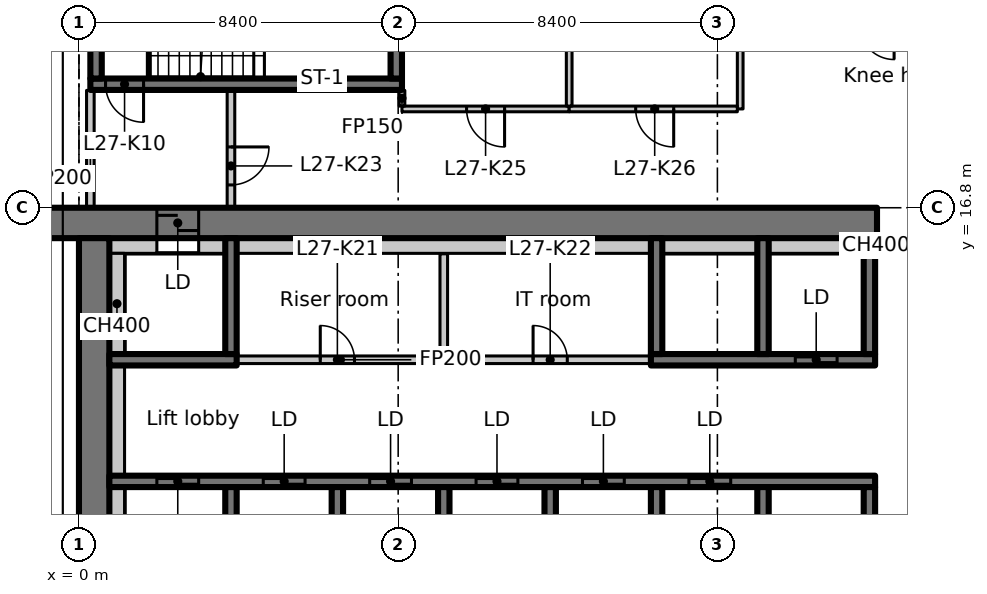
"""IFC4 building model, lengths in metres.
Left out: names, types, materials, properties, quantities, classifications, styles, units other than length and angle.
Written with IfcOpenShell. Run it as: python <this file> out.ifc"""

import sys

from ifc_helpers import new_model, si_unit, direction, frame, frame_2d, origin, place, context, subcontext, project, spatial, rectangle, extrude, element, fill, save


model = new_model("IFC4")
c1 = context("Model", 3, precision=1e-05, world=origin(), true_north=direction((0.0, 1.0)))
c2 = subcontext(c1, "Body", "Model", "MODEL_VIEW")
j1 = project(units=[si_unit("LENGTHUNIT", "METRE"), si_unit("PLANEANGLEUNIT", "RADIAN")], contexts=[c1])
p1 = place(None, origin())
s1 = spatial("IfcSite", under=j1, at=p1, CompositionType="ELEMENT")
p2 = place(p1, origin())
s2 = spatial("IfcBuilding", under=s1, at=p2, CompositionType="ELEMENT")
p3 = place(p2, frame((0.0, 0.0, 113.3)))
s3 = spatial("IfcBuildingStorey", under=s2, at=p3, CompositionType="ELEMENT", Elevation=113.3)
p4 = place(p3, frame((-1.1, 16.4, 0.0), z_axis=(0.0, 0.0, 1.0), x_axis=(1.0, 0.0, 0.0)))
e1 = element("IfcWall", 1, at=p4, inside=s3, PredefinedType="SHEAR", context=c2, shape_type="SweptSolid", body=[
    extrude(rectangle(XDim=22.1, YDim=0.8, at=frame_2d((11.05, 0.0))), origin(), (0.0, 0.0, 1.0), 3.35),
])
p5 = place(p4, frame((3.15, 0.0, 0.0)))
e2 = element("IfcOpeningElement", 2, at=p5, cuts=e1, PredefinedType="OPENING", context=c2, shape_type="SweptSolid", body=[
    extrude(rectangle(XDim=1.1, YDim=2.3, at=frame_2d((0.55, 1.15))), frame((0.0, 0.41, 0.0), z_axis=(0.0, -1.0, 0.0), x_axis=(1.0, 0.0, 0.0)), (0.0, 0.0, 1.0), 0.82),
])
p6 = place(p3, frame((0.4, 7.136, 0.0), z_axis=(0.0, 0.0, 1.0), x_axis=(0.0, 1.0, 0.0)))
e3 = element("IfcWall", 3, at=p6, inside=s3, PredefinedType="SHEAR", context=c2, shape_type="SweptSolid", body=[
    extrude(rectangle(XDim=8.864, YDim=0.8, at=frame_2d((4.432, 0.0))), origin(), (0.0, 0.0, 1.0), 3.35),
])
p7 = place(p3, frame((0.8, 15.8, 0.0), z_axis=(0.0, 0.0, 1.0), x_axis=(1.0, 0.0, 0.0)))
e4 = element("IfcWall", 4, at=p7, inside=s3, PredefinedType="PARTITIONING", context=c2, shape_type="SweptSolid", body=[
    extrude(rectangle(XDim=1.25, YDim=0.4, at=frame_2d((0.625, 0.0))), origin(), (0.0, 0.0, 1.0), 3.35),
])
p8 = place(p3, frame((0.8, 9.6, 0.0), z_axis=(0.0, 0.0, 1.0), x_axis=(1.0, 0.0, 0.0)))
e5 = element("IfcWall", 5, at=p8, inside=s3, PredefinedType="SHEAR", context=c2, shape_type="SweptSolid", body=[
    extrude(rectangle(XDim=20.15, YDim=0.3, at=frame_2d((10.075, 0.0))), origin(), (0.0, 0.0, 1.0), 3.35),
])
p9 = place(p8, frame((1.25, 0.0, 0.0)))
e6 = element("IfcOpeningElement", 6, at=p9, cuts=e5, PredefinedType="OPENING", context=c2, shape_type="SweptSolid", body=[
    extrude(rectangle(XDim=1.1, YDim=2.3, at=frame_2d((0.55, 1.15))), frame((0.0, 0.16, 0.0), z_axis=(0.0, -1.0, 0.0), x_axis=(1.0, 0.0, 0.0)), (0.0, 0.0, 1.0), 0.32),
])
p10 = place(p8, frame((4.05, 0.0, 0.0)))
e7 = element("IfcOpeningElement", 7, at=p10, cuts=e5, PredefinedType="OPENING", context=c2, shape_type="SweptSolid", body=[
    extrude(rectangle(XDim=1.1, YDim=2.3, at=frame_2d((0.55, 1.15))), frame((0.0, 0.16, 0.0), z_axis=(0.0, -1.0, 0.0), x_axis=(1.0, 0.0, 0.0)), (0.0, 0.0, 1.0), 0.32),
])
p11 = place(p8, frame((6.85, 0.0, 0.0)))
e8 = element("IfcOpeningElement", 8, at=p11, cuts=e5, PredefinedType="OPENING", context=c2, shape_type="SweptSolid", body=[
    extrude(rectangle(XDim=1.1, YDim=2.3, at=frame_2d((0.55, 1.15))), frame((0.0, 0.16, 0.0), z_axis=(0.0, -1.0, 0.0), x_axis=(1.0, 0.0, 0.0)), (0.0, 0.0, 1.0), 0.32),
])
p12 = place(p8, frame((9.65, 0.0, 0.0)))
e9 = element("IfcOpeningElement", 9, at=p12, cuts=e5, PredefinedType="OPENING", context=c2, shape_type="SweptSolid", body=[
    extrude(rectangle(XDim=1.1, YDim=2.3, at=frame_2d((0.55, 1.15))), frame((0.0, 0.16, 0.0), z_axis=(0.0, -1.0, 0.0), x_axis=(1.0, 0.0, 0.0)), (0.0, 0.0, 1.0), 0.32),
])
p13 = place(p8, frame((12.45, 0.0, 0.0)))
e10 = element("IfcOpeningElement", 10, at=p13, cuts=e5, PredefinedType="OPENING", context=c2, shape_type="SweptSolid", body=[
    extrude(rectangle(XDim=1.1, YDim=2.3, at=frame_2d((0.55, 1.15))), frame((0.0, 0.16, 0.0), z_axis=(0.0, -1.0, 0.0), x_axis=(1.0, 0.0, 0.0)), (0.0, 0.0, 1.0), 0.32),
])
p14 = place(p8, frame((15.25, 0.0, 0.0)))
e11 = element("IfcOpeningElement", 11, at=p14, cuts=e5, PredefinedType="OPENING", context=c2, shape_type="SweptSolid", body=[
    extrude(rectangle(XDim=1.1, YDim=2.3, at=frame_2d((0.55, 1.15))), frame((0.0, 0.16, 0.0), z_axis=(0.0, -1.0, 0.0), x_axis=(1.0, 0.0, 0.0)), (0.0, 0.0, 1.0), 0.32),
])
for number, where, z_axis, x_axis in (
    (12, (4.0, 7.15, 0.0), (0.0, 0.0, 1.0), (0.0, 1.0, 0.0)),
    (13, (6.8, 7.15, 0.0), (0.0, 0.0, 1.0), (0.0, 1.0, 0.0)),
    (14, (9.6, 7.15, 0.0), (0.0, 0.0, 1.0), (0.0, 1.0, 0.0)),
    (15, (12.4, 7.15, 0.0), (0.0, 0.0, 1.0), (0.0, 1.0, 0.0)),
    (16, (15.2, 7.15, 0.0), (0.0, 0.0, 1.0), (0.0, 1.0, 0.0)),
    (17, (18.0, 7.15, 0.0), (0.0, 0.0, 1.0), (0.0, 1.0, 0.0)),
    (18, (20.8, 7.15, 0.0), (0.0, 0.0, 1.0), (0.0, 1.0, 0.0)),
):
    element("IfcWall", number, at=place(p3, frame(where, z_axis=z_axis, x_axis=x_axis)), inside=s3, PredefinedType="SHEAR", context=c2, shape_type="SweptSolid", body=[
        extrude(rectangle(XDim=2.3, YDim=0.3, at=frame_2d((1.15, 0.0))), origin(), (0.0, 0.0, 1.0), 3.35),
    ])
p15 = place(p3, frame((0.8, 12.8, 0.0), z_axis=(0.0, 0.0, 1.0), x_axis=(1.0, 0.0, 0.0)))
e19 = element("IfcWall", 19, at=p15, inside=s3, PredefinedType="SHEAR", context=c2, shape_type="SweptSolid", body=[
    extrude(rectangle(XDim=3.35, YDim=0.3, at=frame_2d((1.675, 0.0))), origin(), (0.0, 0.0, 1.0), 3.35),
])
p16 = place(p3, frame((4.0, 12.95, 0.0), z_axis=(0.0, 0.0, 1.0), x_axis=(0.0, 1.0, 0.0)))
e20 = element("IfcWall", 20, at=p16, inside=s3, PredefinedType="SHEAR", context=c2, shape_type="SweptSolid", body=[
    extrude(rectangle(XDim=3.05, YDim=0.3, at=frame_2d((1.525, 0.0))), origin(), (0.0, 0.0, 1.0), 3.35),
])
p17 = place(p3, frame((15.05, 12.8, 0.0), z_axis=(0.0, 0.0, 1.0), x_axis=(1.0, 0.0, 0.0)))
e21 = element("IfcWall", 21, at=p17, inside=s3, PredefinedType="SHEAR", context=c2, shape_type="SweptSolid", body=[
    extrude(rectangle(XDim=5.9, YDim=0.3, at=frame_2d((2.95, 0.0))), origin(), (0.0, 0.0, 1.0), 3.35),
])
p18 = place(p17, frame((3.8, 0.0, 0.0)))
e22 = element("IfcOpeningElement", 22, at=p18, cuts=e21, PredefinedType="OPENING", context=c2, shape_type="SweptSolid", body=[
    extrude(rectangle(XDim=1.1, YDim=2.3, at=frame_2d((0.55, 1.15))), frame((0.0, 0.16, 0.0), z_axis=(0.0, -1.0, 0.0), x_axis=(1.0, 0.0, 0.0)), (0.0, 0.0, 1.0), 0.32),
])
for number, where, z_axis, x_axis in (
    (23, (15.2, 12.95, 0.0), (0.0, 0.0, 1.0), (0.0, 1.0, 0.0)),
    (24, (18.0, 12.95, 0.0), (0.0, 0.0, 1.0), (0.0, 1.0, 0.0)),
    (25, (20.8, 12.95, 0.0), (0.0, 0.0, 1.0), (0.0, 1.0, 0.0)),
):
    element("IfcWall", number, at=place(p3, frame(where, z_axis=z_axis, x_axis=x_axis)), inside=s3, PredefinedType="SHEAR", context=c2, shape_type="SweptSolid", body=[
        extrude(rectangle(XDim=3.05, YDim=0.3, at=frame_2d((1.525, 0.0))), origin(), (0.0, 0.0, 1.0), 3.35),
    ])
p19 = place(p3, frame((8.5, 20.05, 0.0), z_axis=(0.0, 0.0, 1.0), x_axis=(-1.0, 0.0, 0.0)))
e26 = element("IfcWall", 26, at=p19, inside=s3, PredefinedType="SHEAR", context=c2, shape_type="SweptSolid", body=[
    extrude(rectangle(XDim=8.2, YDim=0.3, at=frame_2d((4.1, 0.0))), origin(), (0.0, 0.0, 1.0), 3.35),
])
p20 = place(p19, frame((6.8, 0.0, 0.0)))
e27 = element("IfcOpeningElement", 27, at=p20, cuts=e26, PredefinedType="OPENING", context=c2, shape_type="SweptSolid", body=[
    extrude(rectangle(XDim=1.0, YDim=2.1, at=frame_2d((0.5, 1.05))), frame((0.0, 0.16, 0.0), z_axis=(0.0, -1.0, 0.0), x_axis=(1.0, 0.0, 0.0)), (0.0, 0.0, 1.0), 0.32),
])
for number, where, z_axis, x_axis in (
    (28, (0.45, 20.2, 0.0), (0.0, 0.0, 1.0), (0.0, 1.0, 0.0)),
    (29, (8.35, 20.2, 0.0), (0.0, 0.0, 1.0), (0.0, 1.0, 0.0)),
):
    element("IfcWall", number, at=place(p3, frame(where, z_axis=z_axis, x_axis=x_axis)), inside=s3, PredefinedType="SHEAR", context=c2, shape_type="SweptSolid", body=[
        extrude(rectangle(XDim=2.55, YDim=0.3, at=frame_2d((1.275, 0.0))), origin(), (0.0, 0.0, 1.0), 3.35),
    ])
p21 = place(p3, frame((0.3, 16.812, 0.0), z_axis=(0.0, 0.0, 1.0), x_axis=(0.0, 1.0, 0.0)))
e30 = element("IfcWall", 30, at=p21, inside=s3, PredefinedType="PARTITIONING", context=c2, shape_type="SweptSolid", body=[
    extrude(rectangle(XDim=3.076, YDim=0.2, at=frame_2d((1.538, 0.0))), origin(), (0.0, 0.0, 1.0), 2.98),
])
p22 = place(p3, frame((4.0, 19.888, 0.0), z_axis=(0.0, 0.0, 1.0), x_axis=(0.0, -1.0, 0.0)))
e31 = element("IfcWall", 31, at=p22, inside=s3, PredefinedType="PARTITIONING", context=c2, shape_type="SweptSolid", body=[
    extrude(rectangle(XDim=3.076, YDim=0.2, at=frame_2d((1.538, 0.0))), origin(), (0.0, 0.0, 1.0), 3.35),
])
p23 = place(p22, frame((1.488, 0.0, 0.0)))
e32 = element("IfcOpeningElement", 32, at=p23, cuts=e31, PredefinedType="OPENING", context=c2, shape_type="SweptSolid", body=[
    extrude(rectangle(XDim=1.0, YDim=2.1, at=frame_2d((0.5, 1.05))), frame((0.0, 0.11, 0.0), z_axis=(0.0, -1.0, 0.0), x_axis=(1.0, 0.0, 0.0)), (0.0, 0.0, 1.0), 0.22),
])
p24 = place(p3, frame((4.162, 12.8, 0.0), z_axis=(0.0, 0.0, 1.0), x_axis=(1.0, 0.0, 0.0)))
e33 = element("IfcWall", 33, at=p24, inside=s3, PredefinedType="PARTITIONING", context=c2, shape_type="SweptSolid", body=[
    extrude(rectangle(XDim=5.438, YDim=0.2, at=frame_2d((2.719, 0.0))), origin(), (0.0, 0.0, 1.0), 3.35),
])
p25 = place(p24, frame((2.188, 0.0, 0.0)))
e34 = element("IfcOpeningElement", 34, at=p25, cuts=e33, PredefinedType="OPENING", context=c2, shape_type="SweptSolid", body=[
    extrude(rectangle(XDim=0.9, YDim=2.1, at=frame_2d((0.45, 1.05))), frame((0.0, 0.11, 0.0), z_axis=(0.0, -1.0, 0.0), x_axis=(1.0, 0.0, 0.0)), (0.0, 0.0, 1.0), 0.22),
])
p26 = place(p3, frame((9.6, 12.8, 0.0), z_axis=(0.0, 0.0, 1.0), x_axis=(1.0, 0.0, 0.0)))
e35 = element("IfcWall", 35, at=p26, inside=s3, PredefinedType="PARTITIONING", context=c2, shape_type="SweptSolid", body=[
    extrude(rectangle(XDim=5.438, YDim=0.2, at=frame_2d((2.719, 0.0))), origin(), (0.0, 0.0, 1.0), 3.35),
])
p27 = place(p26, frame((2.35, 0.0, 0.0)))
e36 = element("IfcOpeningElement", 36, at=p27, cuts=e35, PredefinedType="OPENING", context=c2, shape_type="SweptSolid", body=[
    extrude(rectangle(XDim=0.9, YDim=2.1, at=frame_2d((0.45, 1.05))), frame((0.0, 0.11, 0.0), z_axis=(0.0, -1.0, 0.0), x_axis=(1.0, 0.0, 0.0)), (0.0, 0.0, 1.0), 0.22),
])
p28 = place(p3, frame((9.6, 15.588, 0.0), z_axis=(0.0, 0.0, 1.0), x_axis=(0.0, -1.0, 0.0)))
e37 = element("IfcWall", 37, at=p28, inside=s3, PredefinedType="PARTITIONING", context=c2, shape_type="SweptSolid", body=[
    extrude(rectangle(XDim=2.688, YDim=0.2, at=frame_2d((1.344, 0.0))), origin(), (0.0, 0.0, 1.0), 3.35),
])
p29 = place(p3, frame((12.9, 19.4, 0.0), z_axis=(0.0, 0.0, 1.0), x_axis=(-1.0, 0.0, 0.0)))
e38 = element("IfcWall", 38, at=p29, inside=s3, PredefinedType="PARTITIONING", context=c2, shape_type="SweptSolid", body=[
    extrude(rectangle(XDim=4.4, YDim=0.15, at=frame_2d((2.2, 0.0))), origin(), (0.0, 0.0, 1.0), 3.35),
])
p30 = place(p29, frame((1.7, 0.0, 0.0)))
e39 = element("IfcOpeningElement", 39, at=p30, cuts=e38, PredefinedType="OPENING", context=c2, shape_type="SweptSolid", body=[
    extrude(rectangle(XDim=1.0, YDim=2.1, at=frame_2d((0.5, 1.05))), frame((0.0, 0.085, 0.0), z_axis=(0.0, -1.0, 0.0), x_axis=(1.0, 0.0, 0.0)), (0.0, 0.0, 1.0), 0.17),
])
p31 = place(p3, frame((8.5, 19.475, 0.0), z_axis=(0.0, 0.0, 1.0), x_axis=(0.0, 1.0, 0.0)))
e40 = element("IfcWall", 40, at=p31, inside=s3, PredefinedType="PARTITIONING", context=c2, shape_type="SweptSolid", body=[
    extrude(rectangle(XDim=0.413, YDim=0.15, at=frame_2d((0.207, 0.0))), origin(), (0.0, 0.0, 1.0), 3.35),
])
p32 = place(p3, frame((17.4, 23.825, 0.0), z_axis=(0.0, 0.0, 1.0), x_axis=(0.0, -1.0, 0.0)))
e41 = element("IfcWall", 41, at=p32, inside=s3, PredefinedType="PARTITIONING", context=c2, shape_type="SweptSolid", body=[
    extrude(rectangle(XDim=4.425, YDim=0.15, at=frame_2d((2.212, 0.0))), origin(), (0.0, 0.0, 1.0), 3.35),
])
p33 = place(p3, frame((17.325, 19.4, 0.0), z_axis=(0.0, 0.0, 1.0), x_axis=(-1.0, 0.0, 0.0)))
e42 = element("IfcWall", 42, at=p33, inside=s3, PredefinedType="PARTITIONING", context=c2, shape_type="SweptSolid", body=[
    extrude(rectangle(XDim=4.425, YDim=0.15, at=frame_2d((2.212, 0.0))), origin(), (0.0, 0.0, 1.0), 3.35),
])
p34 = place(p33, frame((1.675, 0.0, 0.0)))
e43 = element("IfcOpeningElement", 43, at=p34, cuts=e42, PredefinedType="OPENING", context=c2, shape_type="SweptSolid", body=[
    extrude(rectangle(XDim=1.0, YDim=2.1, at=frame_2d((0.5, 1.05))), frame((0.0, 0.085, 0.0), z_axis=(0.0, -1.0, 0.0), x_axis=(1.0, 0.0, 0.0)), (0.0, 0.0, 1.0), 0.17),
])
p35 = place(p3, frame((12.9, 23.825, 0.0), z_axis=(0.0, 0.0, 1.0), x_axis=(0.0, -1.0, 0.0)))
e44 = element("IfcWall", 44, at=p35, inside=s3, PredefinedType="PARTITIONING", context=c2, shape_type="SweptSolid", body=[
    extrude(rectangle(XDim=4.35, YDim=0.15, at=frame_2d((2.175, 0.0))), origin(), (0.0, 0.0, 1.0), 3.35),
])
p36 = place(p3, frame((1.0, 7.15, 0.0), z_axis=(0.0, 0.0, 1.0), x_axis=(0.0, 1.0, 0.0)))
e45 = element("IfcWall", 45, at=p36, inside=s3, PredefinedType="PARTITIONING", context=c2, shape_type="SweptSolid", body=[
    extrude(rectangle(XDim=2.3, YDim=0.4, at=frame_2d((1.15, 0.0))), origin(), (0.0, 0.0, 1.0), 3.35),
])
p37 = place(p3, frame((1.0, 9.75, 0.0), z_axis=(0.0, 0.0, 1.0), x_axis=(0.0, 1.0, 0.0)))
e46 = element("IfcWall", 46, at=p37, inside=s3, PredefinedType="PARTITIONING", context=c2, shape_type="SweptSolid", body=[
    extrude(rectangle(XDim=2.9, YDim=0.4, at=frame_2d((1.45, 0.0))), origin(), (0.0, 0.0, 1.0), 3.35),
])
p38 = place(p3, frame((1.0, 12.95, 0.0), z_axis=(0.0, 0.0, 1.0), x_axis=(0.0, 1.0, 0.0)))
e47 = element("IfcWall", 47, at=p38, inside=s3, PredefinedType="PARTITIONING", context=c2, shape_type="SweptSolid", body=[
    extrude(rectangle(XDim=2.65, YDim=0.4, at=frame_2d((1.325, 0.0))), origin(), (0.0, 0.0, 1.0), 3.35),
])
p39 = place(p3, frame((3.15, 15.8, 0.0), z_axis=(0.0, 0.0, 1.0), x_axis=(1.0, 0.0, 0.0)))
e48 = element("IfcWall", 48, at=p39, inside=s3, PredefinedType="PARTITIONING", context=c2, shape_type="SweptSolid", body=[
    extrude(rectangle(XDim=0.7, YDim=0.4, at=frame_2d((0.35, 0.0))), origin(), (0.0, 0.0, 1.0), 3.35),
])
p40 = place(p3, frame((4.15, 15.8, 0.0), z_axis=(0.0, 0.0, 1.0), x_axis=(1.0, 0.0, 0.0)))
e49 = element("IfcWall", 49, at=p40, inside=s3, PredefinedType="PARTITIONING", context=c2, shape_type="SweptSolid", body=[
    extrude(rectangle(XDim=10.9, YDim=0.4, at=frame_2d((5.45, 0.0))), origin(), (0.0, 0.0, 1.0), 3.35),
])
for number, where, z_axis, x_axis in (
    (50, (15.35, 15.8, 0.0), (0.0, 0.0, 1.0), (1.0, 0.0, 0.0)),
    (51, (18.15, 15.8, 0.0), (0.0, 0.0, 1.0), (1.0, 0.0, 0.0)),
):
    element("IfcWall", number, at=place(p3, frame(where, z_axis=z_axis, x_axis=x_axis)), inside=s3, PredefinedType="PARTITIONING", context=c2, shape_type="SweptSolid", body=[
        extrude(rectangle(XDim=2.5, YDim=0.4, at=frame_2d((1.25, 0.0))), origin(), (0.0, 0.0, 1.0), 3.35),
    ])
p41 = place(p3, frame((20.95, 15.8, 0.0), z_axis=(0.0, 0.0, 1.0), x_axis=(1.0, 0.0, 0.0)))
e52 = element("IfcWall", 52, at=p41, inside=s3, PredefinedType="PARTITIONING", context=c2, shape_type="SweptSolid", body=[
    extrude(rectangle(XDim=0.05, YDim=0.4, at=frame_2d((0.025, 0.0))), origin(), (0.0, 0.0, 1.0), 3.35),
])
p42 = place(p9, origin())
e53 = element("IfcDoor", 53, at=p42, inside=s3, OperationType="SLIDING_TO_LEFT", PredefinedType="DOOR", context=c2, shape_type="SweptSolid", body=[
    extrude(rectangle(XDim=1.1, YDim=2.3, at=frame_2d((0.55, 1.15))), frame((0.0, 0.025, 0.0), z_axis=(0.0, -1.0, 0.0), x_axis=(1.0, 0.0, 0.0)), (0.0, 0.0, 1.0), 0.05),
])
fill(e6, e53)
p43 = place(p10, origin())
e54 = element("IfcDoor", 54, at=p43, inside=s3, OperationType="SLIDING_TO_LEFT", PredefinedType="DOOR", context=c2, shape_type="SweptSolid", body=[
    extrude(rectangle(XDim=1.1, YDim=2.3, at=frame_2d((0.55, 1.15))), frame((0.0, 0.025, 0.0), z_axis=(0.0, -1.0, 0.0), x_axis=(1.0, 0.0, 0.0)), (0.0, 0.0, 1.0), 0.05),
])
fill(e7, e54)
p44 = place(p11, origin())
e55 = element("IfcDoor", 55, at=p44, inside=s3, OperationType="SLIDING_TO_LEFT", PredefinedType="DOOR", context=c2, shape_type="SweptSolid", body=[
    extrude(rectangle(XDim=1.1, YDim=2.3, at=frame_2d((0.55, 1.15))), frame((0.0, 0.025, 0.0), z_axis=(0.0, -1.0, 0.0), x_axis=(1.0, 0.0, 0.0)), (0.0, 0.0, 1.0), 0.05),
])
fill(e8, e55)
p45 = place(p12, origin())
e56 = element("IfcDoor", 56, at=p45, inside=s3, OperationType="SLIDING_TO_LEFT", PredefinedType="DOOR", context=c2, shape_type="SweptSolid", body=[
    extrude(rectangle(XDim=1.1, YDim=2.3, at=frame_2d((0.55, 1.15))), frame((0.0, 0.025, 0.0), z_axis=(0.0, -1.0, 0.0), x_axis=(1.0, 0.0, 0.0)), (0.0, 0.0, 1.0), 0.05),
])
fill(e9, e56)
p46 = place(p13, origin())
e57 = element("IfcDoor", 57, at=p46, inside=s3, OperationType="SLIDING_TO_LEFT", PredefinedType="DOOR", context=c2, shape_type="SweptSolid", body=[
    extrude(rectangle(XDim=1.1, YDim=2.3, at=frame_2d((0.55, 1.15))), frame((0.0, 0.025, 0.0), z_axis=(0.0, -1.0, 0.0), x_axis=(1.0, 0.0, 0.0)), (0.0, 0.0, 1.0), 0.05),
])
fill(e10, e57)
p47 = place(p14, origin())
e58 = element("IfcDoor", 58, at=p47, inside=s3, OperationType="SLIDING_TO_LEFT", PredefinedType="DOOR", context=c2, shape_type="SweptSolid", body=[
    extrude(rectangle(XDim=1.1, YDim=2.3, at=frame_2d((0.55, 1.15))), frame((0.0, 0.025, 0.0), z_axis=(0.0, -1.0, 0.0), x_axis=(1.0, 0.0, 0.0)), (0.0, 0.0, 1.0), 0.05),
])
fill(e11, e58)
p48 = place(p5, origin())
e59 = element("IfcDoor", 59, at=p48, inside=s3, OperationType="SLIDING_TO_LEFT", PredefinedType="DOOR", context=c2, shape_type="SweptSolid", body=[
    extrude(rectangle(XDim=1.1, YDim=2.3, at=frame_2d((0.55, 1.15))), frame((0.0, 0.025, 0.0), z_axis=(0.0, -1.0, 0.0), x_axis=(1.0, 0.0, 0.0)), (0.0, 0.0, 1.0), 0.05),
])
fill(e2, e59)
p49 = place(p18, origin())
e60 = element("IfcDoor", 60, at=p49, inside=s3, OperationType="SLIDING_TO_LEFT", PredefinedType="DOOR", context=c2, shape_type="SweptSolid", body=[
    extrude(rectangle(XDim=1.1, YDim=2.3, at=frame_2d((0.55, 1.15))), frame((0.0, 0.025, 0.0), z_axis=(0.0, -1.0, 0.0), x_axis=(1.0, 0.0, 0.0)), (0.0, 0.0, 1.0), 0.05),
])
fill(e22, e60)
p50 = place(p20, origin())
e61 = element("IfcDoor", 61, at=p50, inside=s3, OperationType="SINGLE_SWING_LEFT", PredefinedType="DOOR", context=c2, shape_type="SweptSolid", body=[
    extrude(rectangle(XDim=1.0, YDim=2.1, at=frame_2d((0.5, 1.05))), frame((0.0, 0.025, 0.0), z_axis=(0.0, -1.0, 0.0), x_axis=(1.0, 0.0, 0.0)), (0.0, 0.0, 1.0), 0.05),
])
fill(e27, e61)
p51 = place(p25, origin())
e62 = element("IfcDoor", 62, at=p51, inside=s3, OperationType="SINGLE_SWING_RIGHT", PredefinedType="DOOR", context=c2, shape_type="SweptSolid", body=[
    extrude(rectangle(XDim=0.9, YDim=2.1, at=frame_2d((0.45, 1.05))), frame((0.0, 0.025, 0.0), z_axis=(0.0, -1.0, 0.0), x_axis=(1.0, 0.0, 0.0)), (0.0, 0.0, 1.0), 0.05),
])
fill(e34, e62)
p52 = place(p27, origin())
e63 = element("IfcDoor", 63, at=p52, inside=s3, OperationType="SINGLE_SWING_LEFT", PredefinedType="DOOR", context=c2, shape_type="SweptSolid", body=[
    extrude(rectangle(XDim=0.9, YDim=2.1, at=frame_2d((0.45, 1.05))), frame((0.0, 0.025, 0.0), z_axis=(0.0, -1.0, 0.0), x_axis=(1.0, 0.0, 0.0)), (0.0, 0.0, 1.0), 0.05),
])
fill(e36, e63)
p53 = place(p23, origin())
e64 = element("IfcDoor", 64, at=p53, inside=s3, OperationType="SINGLE_SWING_RIGHT", PredefinedType="DOOR", context=c2, shape_type="SweptSolid", body=[
    extrude(rectangle(XDim=1.0, YDim=2.1, at=frame_2d((0.5, 1.05))), frame((0.0, 0.025, 0.0), z_axis=(0.0, -1.0, 0.0), x_axis=(1.0, 0.0, 0.0)), (0.0, 0.0, 1.0), 0.05),
])
fill(e32, e64)
p54 = place(p30, origin())
e65 = element("IfcDoor", 65, at=p54, inside=s3, OperationType="SINGLE_SWING_RIGHT", PredefinedType="DOOR", context=c2, shape_type="SweptSolid", body=[
    extrude(rectangle(XDim=1.0, YDim=2.1, at=frame_2d((0.5, 1.05))), frame((0.0, 0.025, 0.0), z_axis=(0.0, -1.0, 0.0), x_axis=(1.0, 0.0, 0.0)), (0.0, 0.0, 1.0), 0.05),
])
fill(e39, e65)
p55 = place(p34, origin())
e66 = element("IfcDoor", 66, at=p55, inside=s3, OperationType="SINGLE_SWING_LEFT", PredefinedType="DOOR", context=c2, shape_type="SweptSolid", body=[
    extrude(rectangle(XDim=1.0, YDim=2.1, at=frame_2d((0.5, 1.05))), frame((0.0, 0.025, 0.0), z_axis=(0.0, -1.0, 0.0), x_axis=(1.0, 0.0, 0.0)), (0.0, 0.0, 1.0), 0.05),
])
fill(e43, e66)
save(model, sys.argv[1])
